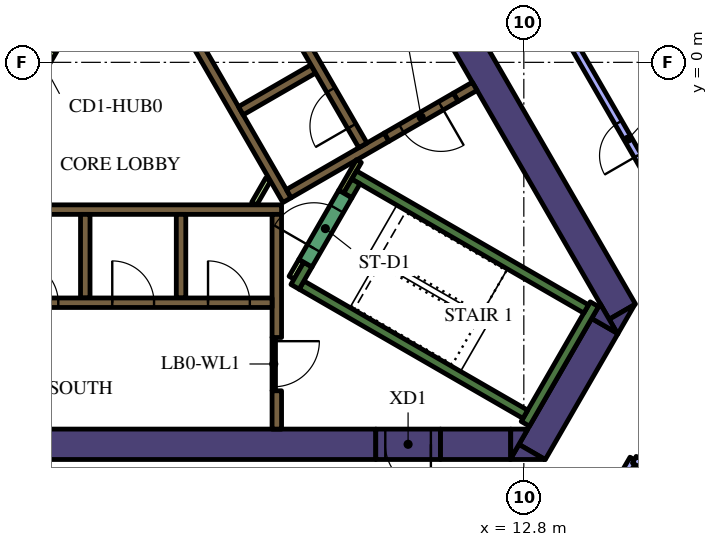
"""IFC4 building model, lengths in metres.
Left out: names, types, materials, properties, quantities, classifications, styles, units other than length and angle.
Written with IfcOpenShell. Run it as: python <this file> out.ifc"""

import sys

from ifc_helpers import new_model, si_unit, direction, frame, frame_2d, origin, place, context, subcontext, project, spatial, polyline, rectangle, outline, extrude, element, fill, save


model = new_model("IFC4")
c1 = context("Model", 3, precision=1e-05, world=origin(), true_north=direction((0.0, 1.0)))
c2 = subcontext(c1, "Body", "Model", "MODEL_VIEW")
j1 = project(units=[si_unit("LENGTHUNIT", "METRE"), si_unit("PLANEANGLEUNIT", "RADIAN")], contexts=[c1])
p1 = place(None, origin())
s1 = spatial("IfcSite", under=j1, at=p1, CompositionType="ELEMENT")
p2 = place(p1, origin())
s2 = spatial("IfcBuilding", under=s1, at=p2, CompositionType="ELEMENT")
p3 = place(p2, frame((0.0, 0.0, 158.4)))
s3 = spatial("IfcBuildingStorey", under=s2, at=p3, CompositionType="ELEMENT", Elevation=158.4)
p4 = place(p3, frame((9.129, 4.289, 0.0), z_axis=(0.0, 0.0, 1.0), x_axis=(0.499995742806, -0.866027861663, 0.0)))
e1 = element("IfcWall", 1, at=p4, inside=s3, PredefinedType="SOLIDWALL", context=c2, shape_type="SweptSolid", body=[
    extrude(rectangle(XDim=12.527, YDim=0.8, at=frame_2d((6.264, 0.0))), origin(), (0.0, 0.0, 1.0), 4.2),
])
p5 = place(p3, origin())
e2 = element("IfcWall", 2, at=p5, inside=s3, PredefinedType="SOLIDWALL", context=c2, shape_type="SweptSolid", body=[
    extrude(outline(polyline([(15.271, -7.15), (15.047, -6.762), (15.719, -6.374), (15.271, -7.15)])), origin(), (0.0, 0.0, 1.0), 4.2),
])
p6 = place(p3, frame((13.018, -10.252, 0.0), z_axis=(0.0, 0.0, 1.0), x_axis=(0.499984020225, 0.866034629516, 0.0)))
e3 = element("IfcWall", 3, at=p6, inside=s3, PredefinedType="SOLIDWALL", context=c2, shape_type="SweptSolid", body=[
    extrude(rectangle(XDim=3.824, YDim=0.8, at=frame_2d((1.912, 0.0))), origin(), (0.0, 0.0, 1.0), 4.2),
])
e4 = element("IfcWall", 4, at=p5, inside=s3, PredefinedType="SOLIDWALL", context=c2, shape_type="SweptSolid", body=[
    extrude(outline(polyline([(12.442, -10.45), (12.671, -10.053), (13.358, -10.45), (12.442, -10.45)])), origin(), (0.0, 0.0, 1.0), 4.2),
])
e5 = element("IfcWall", 5, at=p5, inside=s3, PredefinedType="SOLIDWALL", context=c2, shape_type="SweptSolid", body=[
    extrude(outline(polyline([(14.809, -6.35), (15.257, -7.126), (14.585, -6.738), (14.809, -6.35)])), origin(), (0.0, 0.0, 1.0), 4.2),
])
p7 = place(p3, frame((10.604, -10.05, 0.0), z_axis=(0.0, 0.0, 1.0), x_axis=(1.0, 0.0, 0.0)))
e6 = element("IfcWall", 6, at=p7, inside=s3, PredefinedType="SOLIDWALL", context=c2, shape_type="SweptSolid", body=[
    extrude(rectangle(XDim=1.849, YDim=0.8, at=frame_2d((0.925, 0.0))), origin(), (0.0, 0.0, 1.0), 4.2),
])
e7 = element("IfcWall", 7, at=p5, inside=s3, PredefinedType="SOLIDWALL", context=c2, shape_type="SweptSolid", body=[
    extrude(outline(polyline([(12.904, -9.65), (12.456, -10.426), (12.456, -9.65), (12.904, -9.65)])), origin(), (0.0, 0.0, 1.0), 4.2),
])
p8 = place(p3, frame((-13.378, -10.05, 0.0), z_axis=(0.0, 0.0, 1.0), x_axis=(1.0, 0.0, 0.0)))
e8 = element("IfcWall", 8, at=p8, inside=s3, PredefinedType="SOLIDWALL", context=c2, shape_type="SweptSolid", body=[
    extrude(rectangle(XDim=22.282, YDim=0.8, at=frame_2d((11.141, 0.0))), origin(), (0.0, 0.0, 1.0), 4.2),
])
p9 = place(p3, frame((12.84, -9.511, 0.0), z_axis=(0.0, 0.0, 1.0), x_axis=(0.499997733992, 0.866026712061, 0.0)))
e9 = element("IfcWall", 9, at=p9, inside=s3, PredefinedType="SOLIDWALL", context=c2, shape_type="SweptSolid", body=[
    extrude(rectangle(XDim=3.634, YDim=0.25, at=frame_2d((1.817, 0.0))), origin(), (0.0, 0.0, 1.0), 4.2),
])
p10 = place(p3, frame((12.84, -9.261, 0.0), z_axis=(0.0, 0.0, 1.0), x_axis=(-0.866013990052, 0.500019768644, 0.0)))
e10 = element("IfcWall", 10, at=p10, inside=s3, PredefinedType="SOLIDWALL", context=c2, shape_type="SweptSolid", body=[
    extrude(rectangle(XDim=6.8, YDim=0.25, at=frame_2d((3.4, 0.0))), origin(), (0.0, 0.0, 1.0), 4.2),
])
p11 = place(p3, frame((6.78, -5.906, 0.0), z_axis=(0.0, 0.0, 1.0), x_axis=(0.500223362819, 0.865896406789, 0.0)))
e11 = element("IfcWall", 11, at=p11, inside=s3, PredefinedType="SOLIDWALL", context=c2, shape_type="SweptSolid", body=[
    extrude(rectangle(XDim=0.675, YDim=0.25, at=frame_2d((0.337, 0.0))), origin(), (0.0, 0.0, 1.0), 4.2),
])
p12 = place(p3, frame((8.334, -2.964, 0.0), z_axis=(0.0, 0.0, 1.0), x_axis=(0.866016039709, -0.500016218704, 0.0)))
e12 = element("IfcWall", 12, at=p12, inside=s3, PredefinedType="SOLIDWALL", context=c2, shape_type="SweptSolid", body=[
    extrude(rectangle(XDim=7.05, YDim=0.25, at=frame_2d((3.525, 0.0))), origin(), (0.0, 0.0, 1.0), 4.2),
])
p13 = place(p3, frame((8.168, -3.503, 0.0), z_axis=(0.0, 0.0, 1.0), x_axis=(0.49972245349, 0.866185586049, 0.0)))
e13 = element("IfcWall", 13, at=p13, inside=s3, PredefinedType="SOLIDWALL", context=c2, shape_type="SweptSolid", body=[
    extrude(rectangle(XDim=0.425, YDim=0.25, at=frame_2d((0.212, 0.0))), origin(), (0.0, 0.0, 1.0), 4.2),
])
p14 = place(p3, frame((-5.545, -3.875, 0.0), z_axis=(0.0, 0.0, 1.0), x_axis=(1.0, 0.0, 0.0)))
e14 = element("IfcWall", 14, at=p14, inside=s3, PredefinedType="SOLIDWALL", context=c2, shape_type="SweptSolid", body=[
    extrude(rectangle(XDim=11.97, YDim=0.25, at=frame_2d((5.985, 0.0))), origin(), (0.0, 0.0, 1.0), 4.2),
])
p15 = place(p3, frame((6.3, -7.24, 0.0), z_axis=(0.0, 0.0, 1.0), x_axis=(0.0, 1.0, 0.0)))
e15 = element("IfcWall", 15, at=p15, inside=s3, PredefinedType="SOLIDWALL", context=c2, shape_type="SweptSolid", body=[
    extrude(rectangle(XDim=3.24, YDim=0.25, at=frame_2d((1.62, 0.0))), origin(), (0.0, 0.0, 1.0), 4.2),
])
p16 = place(p3, frame((6.3, -9.65, 0.0), z_axis=(0.0, 0.0, 1.0), x_axis=(0.0, 1.0, 0.0)))
e16 = element("IfcWall", 16, at=p16, inside=s3, PredefinedType="SOLIDWALL", context=c2, shape_type="SweptSolid", body=[
    extrude(rectangle(XDim=1.008, YDim=0.25, at=frame_2d((0.504, 0.0))), origin(), (0.0, 0.0, 1.0), 4.2),
])
for number, where, z_axis, x_axis in (
    (17, (3.78, -4.0, 0.0), (0.0, 0.0, 1.0), (0.0, -1.0, 0.0)),
    (18, (1.26, -4.0, 0.0), (0.0, 0.0, 1.0), (0.0, -1.0, 0.0)),
):
    element("IfcWall", number, at=place(p3, frame(where, z_axis=z_axis, x_axis=x_axis)), inside=s3, PredefinedType="SOLIDWALL", context=c2, shape_type="SweptSolid", body=[
        extrude(rectangle(XDim=2.2, YDim=0.25, at=frame_2d((1.1, 0.0))), origin(), (0.0, 0.0, 1.0), 4.2),
    ])
p17 = place(p3, frame((11.507, -0.631, 0.0), z_axis=(0.0, 0.0, 1.0), x_axis=(-0.866093731455, -0.499881634324, 0.0)))
e19 = element("IfcWall", 19, at=p17, inside=s3, PredefinedType="SOLIDWALL", context=c2, shape_type="SweptSolid", body=[
    extrude(rectangle(XDim=0.575, YDim=0.25, at=frame_2d((0.288, 0.0))), origin(), (0.0, 0.0, 1.0), 4.2),
])
p18 = place(p3, frame((6.568, -3.627, 0.0), z_axis=(0.0, 0.0, 1.0), x_axis=(-0.499999455981, 0.866025717874, 0.0)))
e20 = element("IfcWall", 20, at=p18, inside=s3, PredefinedType="SOLIDWALL", context=c2, shape_type="SweptSolid", body=[
    extrude(rectangle(XDim=11.978, YDim=0.25, at=frame_2d((5.989, 0.0))), origin(), (0.0, 0.0, 1.0), 4.2),
])
p19 = place(p3, frame((5.354, -1.274, 0.0), z_axis=(0.0, 0.0, 1.0), x_axis=(0.866008176907, 0.50002983664, 0.0)))
e21 = element("IfcWall", 21, at=p19, inside=s3, PredefinedType="SOLIDWALL", context=c2, shape_type="SweptSolid", body=[
    extrude(rectangle(XDim=2.2, YDim=0.25, at=frame_2d((1.1, 0.0))), origin(), (0.0, 0.0, 1.0), 4.2),
])
p20 = place(p3, frame((6.614, -3.456, 0.0), z_axis=(0.0, 0.0, 1.0), x_axis=(0.866032512851, 0.499987686533, 0.0)))
e22 = element("IfcWall", 22, at=p20, inside=s3, PredefinedType="SOLIDWALL", context=c2, shape_type="SweptSolid", body=[
    extrude(rectangle(XDim=2.975, YDim=0.25, at=frame_2d((1.487, 0.0))), origin(), (0.0, 0.0, 1.0), 4.2),
])
p21 = place(p3, frame((6.945, -5.222, 0.0), z_axis=(0.0, 0.0, 1.0), x_axis=(-0.499818422106, -0.866130212453, 0.0)))
e23 = element("IfcWall", 23, at=p21, inside=s3, PredefinedType="PARTITIONING", context=c2, shape_type="SweptSolid", body=[
    extrude(rectangle(XDim=0.514, YDim=0.15, at=frame_2d((0.257, 0.0))), origin(), (0.0, 0.0, 1.0), 3.15),
])
p22 = place(p3, frame((8.459, -2.599, 0.0), z_axis=(0.0, 0.0, 1.0), x_axis=(-0.500041054325, -0.866001699761, 0.0)))
e24 = element("IfcWall", 24, at=p22, inside=s3, PredefinedType="PARTITIONING", context=c2, shape_type="SweptSolid", body=[
    extrude(rectangle(XDim=0.929, YDim=0.15, at=frame_2d((0.464, 0.0))), origin(), (0.0, 0.0, 1.0), 4.2),
])
p23 = place(p3, frame((5.705, -3.718, 0.0), z_axis=(0.0, 0.0, 1.0), x_axis=(0.499962090823, 0.866047289552, 0.0)))
e25 = element("IfcWall", 25, at=p23, inside=s3, PredefinedType="PARTITIONING", context=c2, shape_type="SweptSolid", body=[
    extrude(rectangle(XDim=0.735, YDim=0.15, at=frame_2d((0.367, 0.0))), origin(), (0.0, 0.0, 1.0), 3.15),
])
p24 = place(p3, frame((-6.175, -6.325, 0.0), z_axis=(0.0, 0.0, 1.0), x_axis=(1.0, 0.0, 0.0)))
e26 = element("IfcWall", 26, at=p24, inside=s3, PredefinedType="SOLIDWALL", context=c2, shape_type="SweptSolid", body=[
    extrude(rectangle(XDim=12.35, YDim=0.25, at=frame_2d((6.175, 0.0))), origin(), (0.0, 0.0, 1.0), 4.2),
])
p25 = place(p24, frame((0.585, 0.0, 0.0)))
e27 = element("IfcOpeningElement", 27, at=p25, cuts=e26, PredefinedType="OPENING", context=c2, shape_type="SweptSolid", body=[
    extrude(rectangle(XDim=1.1, YDim=2.1, at=frame_2d((0.55, 1.05))), frame((0.0, 0.135, 0.0), z_axis=(0.0, -1.0, 0.0), x_axis=(1.0, 0.0, 0.0)), (0.0, 0.0, 1.0), 0.27),
])
p26 = place(p24, frame((3.105, 0.0, 0.0)))
e28 = element("IfcOpeningElement", 28, at=p26, cuts=e26, PredefinedType="OPENING", context=c2, shape_type="SweptSolid", body=[
    extrude(rectangle(XDim=1.1, YDim=2.1, at=frame_2d((0.55, 1.05))), frame((0.0, 0.135, 0.0), z_axis=(0.0, -1.0, 0.0), x_axis=(1.0, 0.0, 0.0)), (0.0, 0.0, 1.0), 0.27),
])
p27 = place(p24, frame((5.625, 0.0, 0.0)))
e29 = element("IfcOpeningElement", 29, at=p27, cuts=e26, PredefinedType="OPENING", context=c2, shape_type="SweptSolid", body=[
    extrude(rectangle(XDim=1.1, YDim=2.1, at=frame_2d((0.55, 1.05))), frame((0.0, 0.135, 0.0), z_axis=(0.0, -1.0, 0.0), x_axis=(1.0, 0.0, 0.0)), (0.0, 0.0, 1.0), 0.27),
])
p28 = place(p24, frame((8.145, 0.0, 0.0)))
e30 = element("IfcOpeningElement", 30, at=p28, cuts=e26, PredefinedType="OPENING", context=c2, shape_type="SweptSolid", body=[
    extrude(rectangle(XDim=1.1, YDim=2.1, at=frame_2d((0.55, 1.05))), frame((0.0, 0.135, 0.0), z_axis=(0.0, -1.0, 0.0), x_axis=(1.0, 0.0, 0.0)), (0.0, 0.0, 1.0), 0.27),
])
p29 = place(p24, frame((10.665, 0.0, 0.0)))
e31 = element("IfcOpeningElement", 31, at=p29, cuts=e26, PredefinedType="OPENING", context=c2, shape_type="SweptSolid", body=[
    extrude(rectangle(XDim=1.1, YDim=2.1, at=frame_2d((0.55, 1.05))), frame((0.0, 0.135, 0.0), z_axis=(0.0, -1.0, 0.0), x_axis=(1.0, 0.0, 0.0)), (0.0, 0.0, 1.0), 0.27),
])
p30 = place(p3, frame((8.565, -2.185, 0.0), z_axis=(0.0, 0.0, 1.0), x_axis=(-0.499997954832, 0.866026584559, 0.0)))
e32 = element("IfcWall", 32, at=p30, inside=s3, PredefinedType="SOLIDWALL", context=c2, shape_type="SweptSolid", body=[
    extrude(rectangle(XDim=12.35, YDim=0.25, at=frame_2d((6.175, 0.0))), origin(), (0.0, 0.0, 1.0), 4.2),
])
p31 = place(p30, frame((0.585, 0.0, 0.0)))
e33 = element("IfcOpeningElement", 33, at=p31, cuts=e32, PredefinedType="OPENING", context=c2, shape_type="SweptSolid", body=[
    extrude(rectangle(XDim=1.1, YDim=2.1, at=frame_2d((0.55, 1.05))), frame((0.0, 0.135, 0.0), z_axis=(0.0, -1.0, 0.0), x_axis=(1.0, 0.0, 0.0)), (0.0, 0.0, 1.0), 0.27),
])
p32 = place(p3, frame((7.053, -5.284, 0.0), z_axis=(0.0, 0.0, 1.0), x_axis=(0.500078061341, 0.865980330357, 0.0)))
e34 = element("IfcWall", 34, at=p32, inside=s3, PredefinedType="SOLIDWALL", context=c2, shape_type="SweptSolid", body=[
    extrude(rectangle(XDim=2.1, YDim=0.4, at=frame_2d((1.05, 0.0))), origin(), (0.0, 0.0, 1.0), 4.2),
])
p33 = place(p32, frame((0.45, 0.0, 0.0)))
e35 = element("IfcOpeningElement", 35, at=p33, cuts=e34, PredefinedType="OPENING", context=c2, shape_type="SweptSolid", body=[
    extrude(rectangle(XDim=1.2, YDim=2.1, at=frame_2d((0.6, 1.05))), frame((0.0, 0.21, 0.0), z_axis=(0.0, -1.0, 0.0), x_axis=(1.0, 0.0, 0.0)), (0.0, 0.0, 1.0), 0.42),
])
p34 = place(p3, frame((-0.33, -1.022, 0.0), z_axis=(0.0, 0.0, 1.0), x_axis=(0.500027713859, 0.866009402589, 0.0)))
e36 = element("IfcWall", 36, at=p34, inside=s3, PredefinedType="PARTITIONING", context=c2, shape_type="SweptSolid", body=[
    extrude(rectangle(XDim=2.1, YDim=0.15, at=frame_2d((1.05, 0.0))), origin(), (0.0, 0.0, 1.0), 3.15),
])
p35 = place(p34, frame((0.6, 0.0, 0.0)))
e37 = element("IfcOpeningElement", 37, at=p35, cuts=e36, PredefinedType="OPENING", context=c2, shape_type="SweptSolid", body=[
    extrude(rectangle(XDim=0.9, YDim=2.1, at=frame_2d((0.45, 1.05))), frame((0.0, 0.085, 0.0), z_axis=(0.0, -1.0, 0.0), x_axis=(1.0, 0.0, 0.0)), (0.0, 0.0, 1.0), 0.17),
])
p36 = place(p3, frame((6.22, -7.237, 0.0), z_axis=(0.0, 0.0, 1.0), x_axis=(0.0, -1.0, 0.0)))
e38 = element("IfcWall", 38, at=p36, inside=s3, PredefinedType="PARTITIONING", context=c2, shape_type="SweptSolid", body=[
    extrude(rectangle(XDim=1.4, YDim=0.09, at=frame_2d((0.7, 0.0))), origin(), (0.0, 0.0, 1.0), 3.15),
])
p37 = place(p36, frame((0.1, 0.0, 0.0)))
e39 = element("IfcOpeningElement", 39, at=p37, cuts=e38, PredefinedType="OPENING", context=c2, shape_type="SweptSolid", body=[
    extrude(rectangle(XDim=1.2, YDim=2.1, at=frame_2d((0.6, 1.05))), frame((0.0, 0.055, 0.0), z_axis=(0.0, -1.0, 0.0), x_axis=(1.0, 0.0, 0.0)), (0.0, 0.0, 1.0), 0.11),
])
p38 = place(p3, frame((11.009, -0.919, 0.0), z_axis=(0.0, 0.0, 1.0), x_axis=(-0.866059744384, -0.49994051562, 0.0)))
e40 = element("IfcWall", 40, at=p38, inside=s3, PredefinedType="SOLIDWALL", context=c2, shape_type="SweptSolid", body=[
    extrude(rectangle(XDim=2.1, YDim=0.25, at=frame_2d((1.05, 0.0))), origin(), (0.0, 0.0, 1.0), 4.2),
])
p39 = place(p38, frame((0.45, 0.0, 0.0)))
e41 = element("IfcOpeningElement", 41, at=p39, cuts=e40, PredefinedType="OPENING", context=c2, shape_type="SweptSolid", body=[
    extrude(rectangle(XDim=1.2, YDim=2.1, at=frame_2d((0.6, 1.05))), frame((0.0, 0.135, 0.0), z_axis=(0.0, -1.0, 0.0), x_axis=(1.0, 0.0, 0.0)), (0.0, 0.0, 1.0), 0.27),
])
p40 = place(p3, frame((10.604, -10.05, 0.0), z_axis=(0.0, 0.0, 1.0), x_axis=(-1.0, 0.0, 0.0)))
e42 = element("IfcWall", 42, at=p40, inside=s3, PredefinedType="SOLIDWALL", context=c2, shape_type="SweptSolid", body=[
    extrude(rectangle(XDim=1.7, YDim=0.8, at=frame_2d((0.85, 0.0))), origin(), (0.0, 0.0, 1.0), 4.2),
])
p41 = place(p40, frame((0.25, 0.0, 0.0)))
e43 = element("IfcOpeningElement", 43, at=p41, cuts=e42, PredefinedType="OPENING", context=c2, shape_type="SweptSolid", body=[
    extrude(rectangle(XDim=1.2, YDim=2.1, at=frame_2d((0.6, 1.05))), frame((0.0, 0.41, 0.0), z_axis=(0.0, -1.0, 0.0), x_axis=(1.0, 0.0, 0.0)), (0.0, 0.0, 1.0), 0.82),
])
p42 = place(p3, frame((14.589, -12.331, 0.0), z_axis=(0.0, 0.0, 1.0), x_axis=(0.500044870432, 0.865999496279, 0.0)))
e44 = element("IfcWall", 44, at=p42, inside=s3, PredefinedType="PARTITIONING", context=c2, shape_type="SweptSolid", body=[
    extrude(rectangle(XDim=2.185, YDim=0.2, at=frame_2d((1.092, 0.0))), origin(), (0.0, 0.0, 1.0), 3.15),
])
p43 = place(p3, frame((15.707, -10.454, 0.0), z_axis=(0.0, 0.0, 1.0), x_axis=(0.866017375886, -0.50001390447, 0.0)))
e45 = element("IfcWall", 45, at=p43, inside=s3, PredefinedType="PARTITIONING", context=c2, shape_type="SweptSolid", body=[
    extrude(rectangle(XDim=5.97, YDim=0.2, at=frame_2d((2.985, 0.0))), origin(), (0.0, 0.0, 1.0), 3.15),
])
p44 = place(p3, frame((18.042, -6.35, 0.0), z_axis=(0.0, 0.0, 1.0), x_axis=(-0.499986873641, 0.866032982159, 0.0)))
e46 = element("IfcWall", 46, at=p44, inside=s3, PredefinedType="PARTITIONING", context=c2, shape_type="SweptSolid", body=[
    extrude(rectangle(XDim=9.99, YDim=0.2, at=frame_2d((4.995, 0.0))), origin(), (0.0, 0.0, 1.0), 3.15),
])
p45 = place(p44, frame((4.5, 0.0, 0.0)))
e47 = element("IfcOpeningElement", 47, at=p45, cuts=e46, PredefinedType="OPENING", context=c2, shape_type="SweptSolid", body=[
    extrude(rectangle(XDim=1.0, YDim=2.1, at=frame_2d((0.5, 1.05))), frame((0.0, 0.11, 0.0), z_axis=(0.0, -1.0, 0.0), x_axis=(1.0, 0.0, 0.0)), (0.0, 0.0, 1.0), 0.22),
])
p46 = place(p27, origin())
e48 = element("IfcDoor", 48, at=p46, inside=s3, OperationType="DOUBLE_DOOR_SLIDING", PredefinedType="DOOR", context=c2, shape_type="SweptSolid", body=[
    extrude(rectangle(XDim=1.1, YDim=2.1, at=frame_2d((0.55, 1.05))), frame((0.0, 0.025, 0.0), z_axis=(0.0, -1.0, 0.0), x_axis=(1.0, 0.0, 0.0)), (0.0, 0.0, 1.0), 0.05),
])
fill(e29, e48)
p47 = place(p28, origin())
e49 = element("IfcDoor", 49, at=p47, inside=s3, OperationType="DOUBLE_DOOR_SLIDING", PredefinedType="DOOR", context=c2, shape_type="SweptSolid", body=[
    extrude(rectangle(XDim=1.1, YDim=2.1, at=frame_2d((0.55, 1.05))), frame((0.0, 0.025, 0.0), z_axis=(0.0, -1.0, 0.0), x_axis=(1.0, 0.0, 0.0)), (0.0, 0.0, 1.0), 0.05),
])
fill(e30, e49)
p48 = place(p29, origin())
e50 = element("IfcDoor", 50, at=p48, inside=s3, OperationType="DOUBLE_DOOR_SLIDING", PredefinedType="DOOR", context=c2, shape_type="SweptSolid", body=[
    extrude(rectangle(XDim=1.1, YDim=2.1, at=frame_2d((0.55, 1.05))), frame((0.0, 0.025, 0.0), z_axis=(0.0, -1.0, 0.0), x_axis=(1.0, 0.0, 0.0)), (0.0, 0.0, 1.0), 0.05),
])
fill(e31, e50)
p49 = place(p31, origin())
e51 = element("IfcDoor", 51, at=p49, inside=s3, OperationType="DOUBLE_DOOR_SLIDING", PredefinedType="DOOR", context=c2, shape_type="SweptSolid", body=[
    extrude(rectangle(XDim=1.1, YDim=2.1, at=frame_2d((0.55, 1.05))), frame((0.0, 0.025, 0.0), z_axis=(0.0, -1.0, 0.0), x_axis=(1.0, 0.0, 0.0)), (0.0, 0.0, 1.0), 0.05),
])
fill(e33, e51)
p50 = place(p33, origin())
e52 = element("IfcDoor", 52, at=p50, inside=s3, OperationType="SINGLE_SWING_LEFT", PredefinedType="DOOR", context=c2, shape_type="SweptSolid", body=[
    extrude(rectangle(XDim=1.2, YDim=2.1, at=frame_2d((0.6, 1.05))), frame((0.0, 0.025, 0.0), z_axis=(0.0, -1.0, 0.0), x_axis=(1.0, 0.0, 0.0)), (0.0, 0.0, 1.0), 0.05),
])
fill(e35, e52)
p51 = place(p35, origin())
e53 = element("IfcDoor", 53, at=p51, inside=s3, OperationType="SINGLE_SWING_LEFT", PredefinedType="DOOR", context=c2, shape_type="SweptSolid", body=[
    extrude(rectangle(XDim=0.9, YDim=2.1, at=frame_2d((0.45, 1.05))), frame((0.0, 0.025, 0.0), z_axis=(0.0, -1.0, 0.0), x_axis=(1.0, 0.0, 0.0)), (0.0, 0.0, 1.0), 0.05),
])
fill(e37, e53)
p52 = place(p37, origin())
e54 = element("IfcDoor", 54, at=p52, inside=s3, OperationType="SINGLE_SWING_LEFT", PredefinedType="DOOR", context=c2, shape_type="SweptSolid", body=[
    extrude(rectangle(XDim=1.2, YDim=2.1, at=frame_2d((0.6, 1.05))), frame((0.0, 0.025, 0.0), z_axis=(0.0, -1.0, 0.0), x_axis=(1.0, 0.0, 0.0)), (0.0, 0.0, 1.0), 0.05),
])
fill(e39, e54)
p53 = place(p39, origin())
e55 = element("IfcDoor", 55, at=p53, inside=s3, OperationType="SINGLE_SWING_LEFT", PredefinedType="DOOR", context=c2, shape_type="SweptSolid", body=[
    extrude(rectangle(XDim=1.2, YDim=2.1, at=frame_2d((0.6, 1.05))), frame((0.0, 0.025, 0.0), z_axis=(0.0, -1.0, 0.0), x_axis=(1.0, 0.0, 0.0)), (0.0, 0.0, 1.0), 0.05),
])
fill(e41, e55)
p54 = place(p41, origin())
e56 = element("IfcDoor", 56, at=p54, inside=s3, OperationType="SINGLE_SWING_LEFT", PredefinedType="DOOR", context=c2, shape_type="SweptSolid", body=[
    extrude(rectangle(XDim=1.2, YDim=2.1, at=frame_2d((0.6, 1.05))), frame((0.0, 0.025, 0.0), z_axis=(0.0, -1.0, 0.0), x_axis=(1.0, 0.0, 0.0)), (0.0, 0.0, 1.0), 0.05),
])
fill(e43, e56)
p55 = place(p45, origin())
e57 = element("IfcDoor", 57, at=p55, inside=s3, OperationType="SINGLE_SWING_RIGHT", PredefinedType="DOOR", context=c2, shape_type="SweptSolid", body=[
    extrude(rectangle(XDim=1.0, YDim=2.1, at=frame_2d((0.5, 1.05))), frame((0.0, 0.025, 0.0), z_axis=(0.0, -1.0, 0.0), x_axis=(1.0, 0.0, 0.0)), (0.0, 0.0, 1.0), 0.05),
])
fill(e47, e57)
save(model, sys.argv[1])
